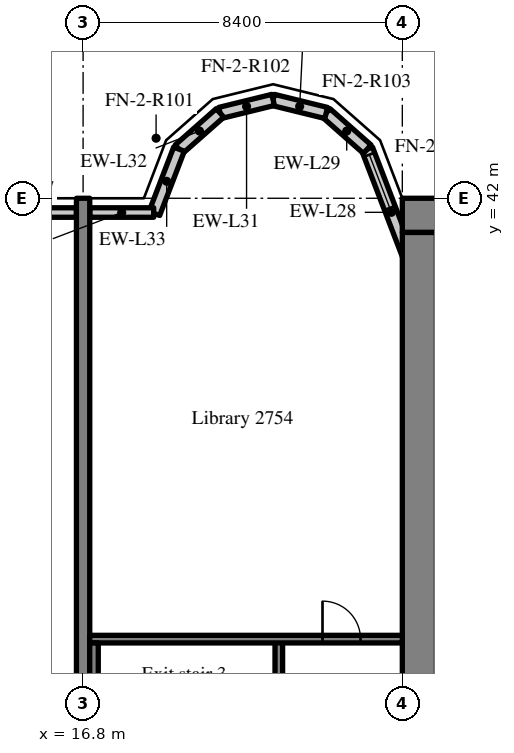
"""IFC4 building model, lengths in metres.
Left out: names, types, materials, properties, quantities, classifications, styles, units other than length and angle.
Written with IfcOpenShell. Run it as: python <this file> out.ifc"""

import sys

from ifc_helpers import new_model, si_unit, direction, frame, frame_2d, origin, place, context, subcontext, project, spatial, rectangle, extrude, source, transform, mapped, element, fill, save


model = new_model("IFC4")
c1 = context("Model", 3, precision=1e-05, world=origin(), true_north=direction((0.0, 1.0)))
c2 = subcontext(c1, "Body", "Model", "MODEL_VIEW")
j1 = project(units=[si_unit("LENGTHUNIT", "METRE"), si_unit("PLANEANGLEUNIT", "RADIAN")], contexts=[c1])
p1 = place(None, origin())
s1 = spatial("IfcSite", under=j1, at=p1, CompositionType="ELEMENT")
p2 = place(p1, origin())
s2 = spatial("IfcBuilding", under=s1, at=p2, CompositionType="ELEMENT")
p3 = place(p2, frame((0.0, 0.0, 114.2)))
s3 = spatial("IfcBuildingStorey", under=s2, at=p3, CompositionType="ELEMENT", Elevation=114.2)
m1 = source(origin(), c2, "Body", "SweptSolid", [
    extrude(rectangle(XDim=50.4, YDim=0.9, at=frame_2d((25.2, 0.0))), origin(), (0.0, 0.0, 1.0), 3.52),
])
p4 = place(p3, frame((25.2, 41.55, 0.0), z_axis=(0.0, 0.0, 1.0), x_axis=(1.0, 0.0, 0.0)))
e1 = element("IfcWall", 1, at=p4, inside=s3, PredefinedType="SHEAR", context=c2, shape_type="MappedRepresentation", body=[
    mapped(m1, transform((0.0, 0.0, 0.0), scale=1.0)),
])
m2 = source(origin(), c2, "Body", "SweptSolid", [
    extrude(rectangle(XDim=18.2, YDim=0.9, at=frame_2d((9.1, 0.0))), origin(), (0.0, 0.0, 1.0), 3.52),
])
p5 = place(p3, frame((25.65, 22.9, 0.0), z_axis=(0.0, 0.0, 1.0), x_axis=(0.0, 1.0, 0.0)))
e2 = element("IfcWall", 2, at=p5, inside=s3, PredefinedType="SHEAR", context=c2, shape_type="MappedRepresentation", body=[
    mapped(m2, transform((0.0, 0.0, 0.0), scale=1.0)),
])
m3 = source(origin(), c2, "Body", "SweptSolid", [
    extrude(rectangle(XDim=20.0, YDim=0.35, at=frame_2d((10.0, 0.0))), origin(), (0.0, 0.0, 1.0), 3.52),
])
p6 = place(p3, frame((16.8, 22.0, 0.0), z_axis=(0.0, 0.0, 1.0), x_axis=(0.0, 1.0, 0.0)))
e3 = element("IfcWall", 3, at=p6, inside=s3, PredefinedType="SHEAR", context=c2, shape_type="MappedRepresentation", body=[
    mapped(m3, transform((0.0, 0.0, 0.0), scale=1.0)),
])
m4 = source(origin(), c2, "Body", "SweptSolid", [
    extrude(rectangle(XDim=3.559, YDim=0.3, at=frame_2d((1.78, 0.0))), origin(), (0.0, 0.0, 1.0), 3.52),
])
p7 = place(p3, frame((25.55, 39.969, 0.0), z_axis=(0.0, 0.0, 1.0), x_axis=(-0.35779745313, 0.933799219604, 0.0)))
e4 = element("IfcWall", 4, at=p7, inside=s3, PredefinedType="SOLIDWALL", context=c2, shape_type="MappedRepresentation", body=[
    mapped(m4, transform((0.0, 0.0, 0.0), scale=1.0)),
])
m5 = source(origin(), c2, "Body", "SweptSolid", [
    extrude(rectangle(XDim=1.5, YDim=2.0, at=frame_2d((0.75, 1.0))), frame((0.0, 0.16, 0.0), z_axis=(0.0, -1.0, 0.0), x_axis=(1.0, 0.0, 0.0)), (0.0, 0.0, 1.0), 0.32),
])
p8 = place(p7, frame((1.903, 0.0, 0.9)))
e5 = element("IfcOpeningElement", 5, at=p8, cuts=e4, PredefinedType="OPENING", context=c2, shape_type="MappedRepresentation", body=[
    mapped(m5, transform((0.0, 0.0, 0.0), scale=1.0)),
])
m6 = source(origin(), c2, "Body", "SweptSolid", [
    extrude(rectangle(XDim=1.44, YDim=0.3, at=frame_2d((0.72, 0.0))), origin(), (0.0, 0.0, 1.0), 3.52),
])
p9 = place(p3, frame((24.277, 43.292, 0.0), z_axis=(0.0, 0.0, 1.0), x_axis=(-0.749649827867, 0.661834673902, 0.0)))
e6 = element("IfcWall", 6, at=p9, inside=s3, PredefinedType="SOLIDWALL", context=c2, shape_type="MappedRepresentation", body=[
    mapped(m6, transform((0.0, 0.0, 0.0), scale=1.0)),
])
m7 = source(origin(), c2, "Body", "SweptSolid", [
    extrude(rectangle(XDim=1.438, YDim=0.3, at=frame_2d((0.719, 0.0))), origin(), (0.0, 0.0, 1.0), 3.52),
])
p10 = place(p3, frame((23.197, 44.245, 0.0), z_axis=(0.0, 0.0, 1.0), x_axis=(-0.971152283879, 0.238460146601, 0.0)))
e7 = element("IfcWall", 7, at=p10, inside=s3, PredefinedType="SOLIDWALL", context=c2, shape_type="MappedRepresentation", body=[
    mapped(m7, transform((0.0, 0.0, 0.0), scale=1.0)),
])
m8 = source(origin(), c2, "Body", "SweptSolid", [
    extrude(rectangle(XDim=1.439, YDim=0.3, at=frame_2d((0.719, 0.0))), origin(), (0.0, 0.0, 1.0), 3.52),
])
p11 = place(p3, frame((21.8, 44.588, 0.0), z_axis=(0.0, 0.0, 1.0), x_axis=(-0.971161932466, -0.238420848351, 0.0)))
e8 = element("IfcWall", 8, at=p11, inside=s3, PredefinedType="SOLIDWALL", context=c2, shape_type="MappedRepresentation", body=[
    mapped(m8, transform((0.0, 0.0, 0.0), scale=1.0)),
])
m9 = source(origin(), c2, "Body", "SweptSolid", [
    extrude(rectangle(XDim=1.44, YDim=0.3, at=frame_2d((0.72, 0.0))), origin(), (0.0, 0.0, 1.0), 3.52),
])
p12 = place(p3, frame((20.403, 44.245, 0.0), z_axis=(0.0, 0.0, 1.0), x_axis=(-0.74957555648, -0.661918790432, 0.0)))
e9 = element("IfcWall", 9, at=p12, inside=s3, PredefinedType="SOLIDWALL", context=c2, shape_type="MappedRepresentation", body=[
    mapped(m9, transform((0.0, 0.0, 0.0), scale=1.0)),
])
m10 = source(origin(), c2, "Body", "SweptSolid", [
    extrude(rectangle(XDim=1.812, YDim=0.3, at=frame_2d((0.906, 0.0))), origin(), (0.0, 0.0, 1.0), 3.52),
])
p13 = place(p3, frame((19.323, 43.292, 0.0), z_axis=(0.0, 0.0, 1.0), x_axis=(-0.357877270961, -0.93376863244, 0.0)))
e10 = element("IfcWall", 10, at=p13, inside=s3, PredefinedType="SOLIDWALL", context=c2, shape_type="MappedRepresentation", body=[
    mapped(m10, transform((0.0, 0.0, 0.0), scale=1.0)),
])
m11 = source(origin(), c2, "Body", "SweptSolid", [
    extrude(rectangle(XDim=3.675, YDim=0.25, at=frame_2d((1.837, 0.0))), origin(), (0.0, 0.0, 1.0), 2.82),
])
p14 = place(p3, frame((16.625, 41.625, 0.0), z_axis=(0.0, 0.0, 1.0), x_axis=(-1.0, 0.0, 0.0)))
e11 = element("IfcWall", 11, at=p14, inside=s3, PredefinedType="SOLIDWALL", context=c2, shape_type="MappedRepresentation", body=[
    mapped(m11, transform((0.0, 0.0, 0.0), scale=1.0)),
])
m12 = source(origin(), c2, "Body", "SweptSolid", [
    extrude(rectangle(XDim=1.5, YDim=1.5, at=frame_2d((0.75, 0.75))), frame((0.0, 0.135, 0.0), z_axis=(0.0, -1.0, 0.0), x_axis=(1.0, 0.0, 0.0)), (0.0, 0.0, 1.0), 0.27),
])
p15 = place(p14, frame((1.087, 0.0, 0.9)))
e12 = element("IfcOpeningElement", 12, at=p15, cuts=e11, PredefinedType="OPENING", context=c2, shape_type="MappedRepresentation", body=[
    mapped(m12, transform((0.0, 0.0, 0.0), scale=1.0)),
])
m13 = source(origin(), c2, "Body", "SweptSolid", [
    extrude(rectangle(XDim=1.683, YDim=0.25, at=frame_2d((0.841, 0.0))), origin(), (0.0, 0.0, 1.0), 2.82),
])
p16 = place(p3, frame((18.658, 41.625, 0.0), z_axis=(0.0, 0.0, 1.0), x_axis=(-1.0, 0.0, 0.0)))
e13 = element("IfcWall", 13, at=p16, inside=s3, PredefinedType="SOLIDWALL", context=c2, shape_type="MappedRepresentation", body=[
    mapped(m13, transform((0.0, 0.0, 0.0), scale=1.0)),
])
m14 = source(origin(), c2, "Body", "SweptSolid", [
    extrude(rectangle(XDim=8.3, YDim=0.2, at=frame_2d((4.15, 0.0))), origin(), (0.0, 0.0, 1.0), 3.52),
])
p17 = place(p3, frame((21.95, 22.1, 0.0), z_axis=(0.0, 0.0, 1.0), x_axis=(0.0, 1.0, 0.0)))
e14 = element("IfcWall", 14, at=p17, inside=s3, PredefinedType="SOLIDWALL", context=c2, shape_type="MappedRepresentation", body=[
    mapped(m14, transform((0.0, 0.0, 0.0), scale=1.0)),
])
m15 = source(origin(), c2, "Body", "SweptSolid", [
    extrude(rectangle(XDim=1.2, YDim=2.1, at=frame_2d((0.6, 1.05))), frame((0.0, 0.11, 0.0), z_axis=(0.0, -1.0, 0.0), x_axis=(1.0, 0.0, 0.0)), (0.0, 0.0, 1.0), 0.22),
])
p18 = place(p17, frame((0.6, 0.0, 0.0)))
e15 = element("IfcOpeningElement", 15, at=p18, cuts=e14, PredefinedType="OPENING", context=c2, shape_type="MappedRepresentation", body=[
    mapped(m15, transform((0.0, 0.0, 0.0), scale=1.0)),
])
m16 = source(origin(), c2, "Body", "SweptSolid", [
    extrude(rectangle(XDim=8.225, YDim=0.2, at=frame_2d((4.112, 0.0))), origin(), (0.0, 0.0, 1.0), 3.52),
])
p19 = place(p3, frame((16.975, 30.4, 0.0), z_axis=(0.0, 0.0, 1.0), x_axis=(1.0, 0.0, 0.0)))
e16 = element("IfcWall", 16, at=p19, inside=s3, PredefinedType="SOLIDWALL", context=c2, shape_type="MappedRepresentation", body=[
    mapped(m16, transform((0.0, 0.0, 0.0), scale=1.0)),
])
m17 = source(origin(), c2, "Body", "SweptSolid", [
    extrude(rectangle(XDim=1.0, YDim=2.1, at=frame_2d((0.5, 1.05))), frame((0.0, 0.11, 0.0), z_axis=(0.0, -1.0, 0.0), x_axis=(1.0, 0.0, 0.0)), (0.0, 0.0, 1.0), 0.22),
])
p20 = place(p19, frame((6.125, 0.0, 0.0)))
e17 = element("IfcOpeningElement", 17, at=p20, cuts=e16, PredefinedType="OPENING", context=c2, shape_type="MappedRepresentation", body=[
    mapped(m17, transform((0.0, 0.0, 0.0), scale=1.0)),
])
m18 = source(origin(), c2, "Body", "SweptSolid", [
    extrude(rectangle(XDim=8.1, YDim=0.225, at=frame_2d((4.05, 0.0))), origin(), (0.0, 0.0, 1.0), 3.52),
])
p21 = place(p3, frame((17.087, 22.2, 0.0), z_axis=(0.0, 0.0, 1.0), x_axis=(0.0, 1.0, 0.0)))
e18 = element("IfcWall", 18, at=p21, inside=s3, PredefinedType="SOLIDWALL", context=c2, shape_type="MappedRepresentation", body=[
    mapped(m18, transform((0.0, 0.0, 0.0), scale=1.0)),
])
m19 = source(origin(), c2, "Body", "SweptSolid", [
    extrude(rectangle(XDim=1.5, YDim=2.0, at=frame_2d((0.75, 1.0))), frame((0.0, 0.03, 0.0), z_axis=(0.0, -1.0, 0.0), x_axis=(1.0, 0.0, 0.0)), (0.0, 0.0, 1.0), 0.06),
])
p22 = place(p8, origin())
e19 = element("IfcWindow", 19, at=p22, inside=s3, PartitioningType="SINGLE_PANEL", PredefinedType="WINDOW", context=c2, shape_type="MappedRepresentation", body=[
    mapped(m19, transform((0.0, 0.0, 0.0), scale=1.0)),
])
fill(e5, e19)
m20 = source(origin(), c2, "Body", "SweptSolid", [
    extrude(rectangle(XDim=1.0, YDim=2.1, at=frame_2d((0.5, 1.05))), frame((0.0, 0.025, 0.0), z_axis=(0.0, -1.0, 0.0), x_axis=(1.0, 0.0, 0.0)), (0.0, 0.0, 1.0), 0.05),
])
p23 = place(p20, origin())
e20 = element("IfcDoor", 20, at=p23, inside=s3, OperationType="SINGLE_SWING_LEFT", PredefinedType="DOOR", context=c2, shape_type="MappedRepresentation", body=[
    mapped(m20, transform((0.0, 0.0, 0.0), scale=1.0)),
])
fill(e17, e20)
save(model, sys.argv[1])
